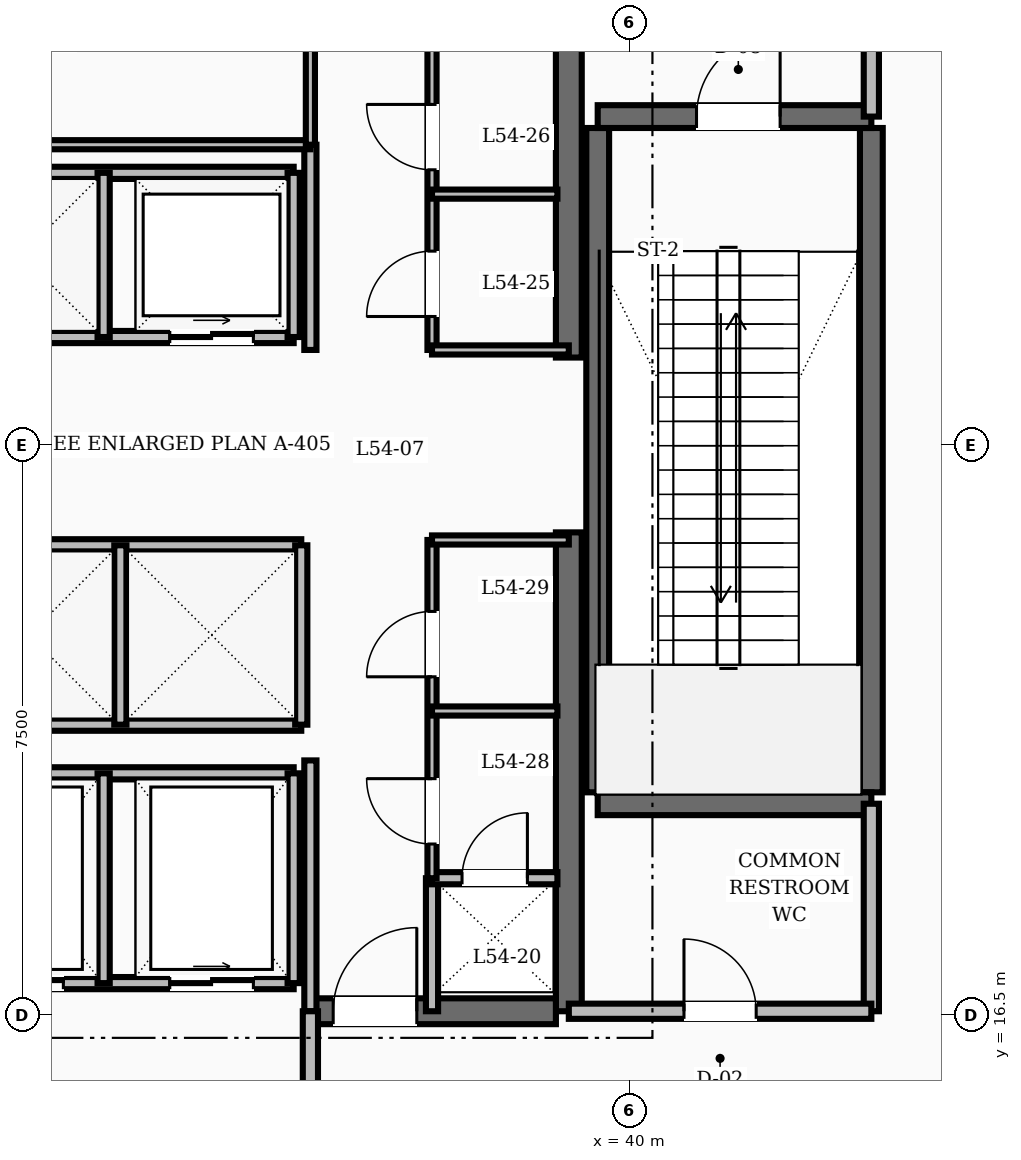
"""IFC4 building model, lengths in metres.
Left out: names, types, materials, properties, quantities, classifications, styles, units other than length and angle.
Written with IfcOpenShell. Run it as: python <this file> out.ifc"""

import sys

from ifc_helpers import new_model, si_unit, direction, frame, frame_2d, origin, place, context, subcontext, project, spatial, rectangle, extrude, element, fill, save


model = new_model("IFC4")
c1 = context("Model", 3, precision=1e-05, world=origin(), true_north=direction((0.0, 1.0)))
c2 = subcontext(c1, "Body", "Model", "MODEL_VIEW")
j1 = project(units=[si_unit("LENGTHUNIT", "METRE"), si_unit("PLANEANGLEUNIT", "RADIAN")], contexts=[c1])
p1 = place(None, origin())
s1 = spatial("IfcSite", under=j1, at=p1, CompositionType="ELEMENT")
p2 = place(p1, origin())
s2 = spatial("IfcBuilding", under=s1, at=p2, CompositionType="ELEMENT")
p3 = place(p2, frame((0.0, 0.0, 208.4)))
s3 = spatial("IfcBuildingStorey", under=s2, at=p3, CompositionType="ELEMENT", Elevation=208.4)
for number, where, z_axis, x_axis in (
    (1, (39.2, 16.55, 0.0), (0.0, 0.0, 1.0), (0.0, 1.0, 0.0)),
    (2, (39.2, 25.15, 0.0), (0.0, 0.0, 1.0), (0.0, 1.0, 0.0)),
):
    element("IfcWall", number, at=place(p3, frame(where, z_axis=z_axis, x_axis=x_axis)), inside=s3, PredefinedType="SHEAR", context=c2, shape_type="SweptSolid", body=[
        extrude(rectangle(XDim=6.3, YDim=0.34, at=frame_2d((3.15, 0.0))), origin(), (0.0, 0.0, 1.0), 6.4),
    ])
p4 = place(p3, frame((35.8, 16.55, 0.0), z_axis=(0.0, 0.0, 1.0), x_axis=(1.0, 0.0, 0.0)))
e3 = element("IfcWall", 3, at=p4, inside=s3, PredefinedType="SHEAR", context=c2, shape_type="SweptSolid", body=[
    extrude(rectangle(XDim=3.23, YDim=0.34, at=frame_2d((1.615, 0.0))), origin(), (0.0, 0.0, 1.0), 6.4),
])
p5 = place(p4, frame((0.3, 0.0, 0.0)))
e4 = element("IfcOpeningElement", 4, at=p5, cuts=e3, PredefinedType="OPENING", context=c2, shape_type="SweptSolid", body=[
    extrude(rectangle(XDim=1.1, YDim=2.1, at=frame_2d((0.55, 1.05))), frame((0.0, 0.18, 0.0), z_axis=(0.0, -1.0, 0.0), x_axis=(1.0, 0.0, 0.0)), (0.0, 0.0, 1.0), 0.36),
])
for number, where, z_axis, x_axis in (
    (5, (43.18, 19.43, 0.0), (0.0, 0.0, 1.0), (0.0, 1.0, 0.0)),
    (6, (39.58, 19.43, 0.0), (0.0, 0.0, 1.0), (0.0, 1.0, 0.0)),
):
    element("IfcWall", number, at=place(p3, frame(where, z_axis=z_axis, x_axis=x_axis)), inside=s3, PredefinedType="SHEAR", context=c2, shape_type="SweptSolid", body=[
        extrude(rectangle(XDim=8.74, YDim=0.3, at=frame_2d((4.37, 0.0))), origin(), (0.0, 0.0, 1.0), 6.4),
    ])
p6 = place(p3, frame((39.58, 19.28, 0.0), z_axis=(0.0, 0.0, 1.0), x_axis=(1.0, 0.0, 0.0)))
e7 = element("IfcWall", 7, at=p6, inside=s3, PredefinedType="SHEAR", context=c2, shape_type="SweptSolid", body=[
    extrude(rectangle(XDim=3.6, YDim=0.3, at=frame_2d((1.8, 0.0))), origin(), (0.0, 0.0, 1.0), 6.4),
])
p7 = place(p3, frame((39.58, 28.32, 0.0), z_axis=(0.0, 0.0, 1.0), x_axis=(1.0, 0.0, 0.0)))
e8 = element("IfcWall", 8, at=p7, inside=s3, PredefinedType="SHEAR", context=c2, shape_type="SweptSolid", body=[
    extrude(rectangle(XDim=3.6, YDim=0.3, at=frame_2d((1.8, 0.0))), origin(), (0.0, 0.0, 1.0), 6.4),
])
p8 = place(p7, frame((1.3, 0.0, 0.0)))
e9 = element("IfcOpeningElement", 9, at=p8, cuts=e8, PredefinedType="OPENING", context=c2, shape_type="SweptSolid", body=[
    extrude(rectangle(XDim=1.1, YDim=2.1, at=frame_2d((0.55, 1.05))), frame((0.0, 0.16, 0.0), z_axis=(0.0, -1.0, 0.0), x_axis=(1.0, 0.0, 0.0)), (0.0, 0.0, 1.0), 0.32),
])
p9 = place(p3, frame((43.18, 28.32, 0.0), z_axis=(0.0, 0.0, 1.0), x_axis=(0.0, 1.0, 0.0)))
e10 = element("IfcWall", 10, at=p9, inside=s3, PredefinedType="SOLIDWALL", context=c2, shape_type="SweptSolid", body=[
    extrude(rectangle(XDim=3.13, YDim=0.2, at=frame_2d((1.565, 0.0))), origin(), (0.0, 0.0, 1.0), 5.13),
])
p10 = place(p9, frame((1.015, 0.0, 0.0)))
e11 = element("IfcOpeningElement", 11, at=p10, cuts=e10, PredefinedType="OPENING", context=c2, shape_type="SweptSolid", body=[
    extrude(rectangle(XDim=1.1, YDim=2.1, at=frame_2d((0.55, 1.05))), frame((0.0, 0.11, 0.0), z_axis=(0.0, -1.0, 0.0), x_axis=(1.0, 0.0, 0.0)), (0.0, 0.0, 1.0), 0.22),
])
p11 = place(p3, frame((43.18, 16.55, 0.0), z_axis=(0.0, 0.0, 1.0), x_axis=(0.0, 1.0, 0.0)))
e12 = element("IfcWall", 12, at=p11, inside=s3, PredefinedType="SOLIDWALL", context=c2, shape_type="SweptSolid", body=[
    extrude(rectangle(XDim=2.73, YDim=0.2, at=frame_2d((1.365, 0.0))), origin(), (0.0, 0.0, 1.0), 5.13),
])
p12 = place(p3, frame((39.2, 16.55, 0.0), z_axis=(0.0, 0.0, 1.0), x_axis=(1.0, 0.0, 0.0)))
e13 = element("IfcWall", 13, at=p12, inside=s3, PredefinedType="SOLIDWALL", context=c2, shape_type="SweptSolid", body=[
    extrude(rectangle(XDim=3.98, YDim=0.2, at=frame_2d((1.99, 0.0))), origin(), (0.0, 0.0, 1.0), 5.13),
])
p13 = place(p12, frame((1.515, 0.0, 0.0)))
e14 = element("IfcOpeningElement", 14, at=p13, cuts=e13, PredefinedType="OPENING", context=c2, shape_type="SweptSolid", body=[
    extrude(rectangle(XDim=0.95, YDim=2.1, at=frame_2d((0.475, 1.05))), frame((0.0, 0.11, 0.0), z_axis=(0.0, -1.0, 0.0), x_axis=(1.0, 0.0, 0.0)), (0.0, 0.0, 1.0), 0.22),
])
p14 = place(p3, frame((35.8, 16.55, 0.0), z_axis=(0.0, 0.0, 1.0), x_axis=(0.0, 1.0, 0.0)))
e15 = element("IfcWall", 15, at=p14, inside=s3, PredefinedType="SOLIDWALL", context=c2, shape_type="SweptSolid", body=[
    extrude(rectangle(XDim=3.3, YDim=0.16, at=frame_2d((1.65, 0.0))), origin(), (0.0, 0.0, 1.0), 5.13),
])
p15 = place(p3, frame((37.4, 16.55, 0.0), z_axis=(0.0, 0.0, 1.0), x_axis=(0.0, 1.0, 0.0)))
e16 = element("IfcWall", 16, at=p15, inside=s3, PredefinedType="SOLIDWALL", context=c2, shape_type="SweptSolid", body=[
    extrude(rectangle(XDim=1.75, YDim=0.16, at=frame_2d((0.875, 0.0))), origin(), (0.0, 0.0, 1.0), 5.13),
])
p16 = place(p3, frame((35.8, 25.25, 0.0), z_axis=(0.0, 0.0, 1.0), x_axis=(0.0, 1.0, 0.0)))
e17 = element("IfcWall", 17, at=p16, inside=s3, PredefinedType="SOLIDWALL", context=c2, shape_type="SweptSolid", body=[
    extrude(rectangle(XDim=2.7, YDim=0.16, at=frame_2d((1.35, 0.0))), origin(), (0.0, 0.0, 1.0), 5.13),
])
p17 = place(p3, frame((35.8, 14.35, 0.0), z_axis=(0.0, 0.0, 1.0), x_axis=(0.0, 1.0, 0.0)))
e18 = element("IfcWall", 18, at=p17, inside=s3, PredefinedType="SOLIDWALL", context=c2, shape_type="SweptSolid", body=[
    extrude(rectangle(XDim=2.2, YDim=0.2, at=frame_2d((1.1, 0.0))), origin(), (0.0, 0.0, 1.0), 5.13),
])
p18 = place(p3, frame((28.42, 25.42, 0.0), z_axis=(0.0, 0.0, 1.0), x_axis=(1.0, 0.0, 0.0)))
e19 = element("IfcWall", 19, at=p18, inside=s3, PredefinedType="SOLIDWALL", context=c2, shape_type="SweptSolid", body=[
    extrude(rectangle(XDim=7.16, YDim=0.16, at=frame_2d((3.58, 0.0))), origin(), (0.0, 0.0, 1.0), 5.13),
])
p19 = place(p18, frame((5.53, 0.0, 0.0)))
e20 = element("IfcOpeningElement", 20, at=p19, cuts=e19, PredefinedType="OPENING", context=c2, shape_type="SweptSolid", body=[
    extrude(rectangle(XDim=1.1, YDim=2.15, at=frame_2d((0.55, 1.075))), frame((0.0, 0.09, 0.0), z_axis=(0.0, -1.0, 0.0), x_axis=(1.0, 0.0, 0.0)), (0.0, 0.0, 1.0), 0.18),
])
p20 = place(p3, frame((28.42, 27.58, 0.0), z_axis=(0.0, 0.0, 1.0), x_axis=(1.0, 0.0, 0.0)))
e21 = element("IfcWall", 21, at=p20, inside=s3, PredefinedType="SOLIDWALL", context=c2, shape_type="SweptSolid", body=[
    extrude(rectangle(XDim=7.16, YDim=0.16, at=frame_2d((3.58, 0.0))), origin(), (0.0, 0.0, 1.0), 5.13),
])
for number, where, z_axis, x_axis in (
    (22, (33.08, 25.42, 0.0), (0.0, 0.0, 1.0), (0.0, 1.0, 0.0)),
    (23, (35.58, 25.42, 0.0), (0.0, 0.0, 1.0), (0.0, 1.0, 0.0)),
):
    element("IfcWall", number, at=place(p3, frame(where, z_axis=z_axis, x_axis=x_axis)), inside=s3, PredefinedType="SOLIDWALL", context=c2, shape_type="SweptSolid", body=[
        extrude(rectangle(XDim=2.16, YDim=0.16, at=frame_2d((1.08, 0.0))), origin(), (0.0, 0.0, 1.0), 5.13),
    ])
p21 = place(p3, frame((28.42, 22.68, 0.0), z_axis=(0.0, 0.0, 1.0), x_axis=(1.0, 0.0, 0.0)))
e24 = element("IfcWall", 24, at=p21, inside=s3, PredefinedType="SOLIDWALL", context=c2, shape_type="SweptSolid", body=[
    extrude(rectangle(XDim=7.26, YDim=0.16, at=frame_2d((3.63, 0.0))), origin(), (0.0, 0.0, 1.0), 5.13),
])
p22 = place(p21, frame((0.53, 0.0, 0.0)))
e25 = element("IfcOpeningElement", 25, at=p22, cuts=e24, PredefinedType="OPENING", context=c2, shape_type="SweptSolid", body=[
    extrude(rectangle(XDim=1.1, YDim=2.15, at=frame_2d((0.55, 1.075))), frame((0.0, 0.09, 0.0), z_axis=(0.0, -1.0, 0.0), x_axis=(1.0, 0.0, 0.0)), (0.0, 0.0, 1.0), 0.18),
])
p23 = place(p3, frame((28.42, 20.32, 0.0), z_axis=(0.0, 0.0, 1.0), x_axis=(1.0, 0.0, 0.0)))
e26 = element("IfcWall", 26, at=p23, inside=s3, PredefinedType="SOLIDWALL", context=c2, shape_type="SweptSolid", body=[
    extrude(rectangle(XDim=7.26, YDim=0.16, at=frame_2d((3.63, 0.0))), origin(), (0.0, 0.0, 1.0), 5.13),
])
for number, where, z_axis, x_axis in (
    (27, (33.3, 20.32, 0.0), (0.0, 0.0, 1.0), (0.0, 1.0, 0.0)),
    (28, (35.68, 20.32, 0.0), (0.0, 0.0, 1.0), (0.0, 1.0, 0.0)),
):
    element("IfcWall", number, at=place(p3, frame(where, z_axis=z_axis, x_axis=x_axis)), inside=s3, PredefinedType="SOLIDWALL", context=c2, shape_type="SweptSolid", body=[
        extrude(rectangle(XDim=2.36, YDim=0.16, at=frame_2d((1.18, 0.0))), origin(), (0.0, 0.0, 1.0), 5.13),
    ])
p24 = place(p3, frame((28.42, 16.92, 0.0), z_axis=(0.0, 0.0, 1.0), x_axis=(1.0, 0.0, 0.0)))
e29 = element("IfcWall", 29, at=p24, inside=s3, PredefinedType="SOLIDWALL", context=c2, shape_type="SweptSolid", body=[
    extrude(rectangle(XDim=7.16, YDim=0.16, at=frame_2d((3.58, 0.0))), origin(), (0.0, 0.0, 1.0), 5.13),
])
p25 = place(p24, frame((0.53, 0.0, 0.0)))
e30 = element("IfcOpeningElement", 30, at=p25, cuts=e29, PredefinedType="OPENING", context=c2, shape_type="SweptSolid", body=[
    extrude(rectangle(XDim=1.1, YDim=2.15, at=frame_2d((0.55, 1.075))), frame((0.0, 0.09, 0.0), z_axis=(0.0, -1.0, 0.0), x_axis=(1.0, 0.0, 0.0)), (0.0, 0.0, 1.0), 0.18),
])
p26 = place(p24, frame((3.03, 0.0, 0.0)))
e31 = element("IfcOpeningElement", 31, at=p26, cuts=e29, PredefinedType="OPENING", context=c2, shape_type="SweptSolid", body=[
    extrude(rectangle(XDim=1.1, YDim=2.15, at=frame_2d((0.55, 1.075))), frame((0.0, 0.09, 0.0), z_axis=(0.0, -1.0, 0.0), x_axis=(1.0, 0.0, 0.0)), (0.0, 0.0, 1.0), 0.18),
])
p27 = place(p24, frame((5.53, 0.0, 0.0)))
e32 = element("IfcOpeningElement", 32, at=p27, cuts=e29, PredefinedType="OPENING", context=c2, shape_type="SweptSolid", body=[
    extrude(rectangle(XDim=1.1, YDim=2.15, at=frame_2d((0.55, 1.075))), frame((0.0, 0.09, 0.0), z_axis=(0.0, -1.0, 0.0), x_axis=(1.0, 0.0, 0.0)), (0.0, 0.0, 1.0), 0.18),
])
p28 = place(p3, frame((28.42, 19.68, 0.0), z_axis=(0.0, 0.0, 1.0), x_axis=(1.0, 0.0, 0.0)))
e33 = element("IfcWall", 33, at=p28, inside=s3, PredefinedType="SOLIDWALL", context=c2, shape_type="SweptSolid", body=[
    extrude(rectangle(XDim=7.16, YDim=0.16, at=frame_2d((3.58, 0.0))), origin(), (0.0, 0.0, 1.0), 5.13),
])
for number, where, z_axis, x_axis in (
    (34, (33.08, 16.92, 0.0), (0.0, 0.0, 1.0), (0.0, 1.0, 0.0)),
    (35, (35.58, 16.92, 0.0), (0.0, 0.0, 1.0), (0.0, 1.0, 0.0)),
):
    element("IfcWall", number, at=place(p3, frame(where, z_axis=z_axis, x_axis=x_axis)), inside=s3, PredefinedType="SOLIDWALL", context=c2, shape_type="SweptSolid", body=[
        extrude(rectangle(XDim=2.76, YDim=0.16, at=frame_2d((1.38, 0.0))), origin(), (0.0, 0.0, 1.0), 5.13),
    ])
p29 = place(p3, frame((28.2, 27.95, 0.0), z_axis=(0.0, 0.0, 1.0), x_axis=(1.0, 0.0, 0.0)))
e36 = element("IfcWall", 36, at=p29, inside=s3, PredefinedType="PARTITIONING", context=c2, shape_type="SweptSolid", body=[
    extrude(rectangle(XDim=7.6, YDim=0.12, at=frame_2d((3.8, 0.0))), origin(), (0.0, 0.0, 1.0), 5.13),
])
p30 = place(p3, frame((35.8, 27.95, 0.0), z_axis=(0.0, 0.0, 1.0), x_axis=(0.0, 1.0, 0.0)))
e37 = element("IfcWall", 37, at=p30, inside=s3, PredefinedType="PARTITIONING", context=c2, shape_type="SweptSolid", body=[
    extrude(rectangle(XDim=3.5, YDim=0.12, at=frame_2d((1.75, 0.0))), origin(), (0.0, 0.0, 1.0), 5.13),
])
p31 = place(p30, frame((1.275, 0.0, 0.0)))
e38 = element("IfcOpeningElement", 38, at=p31, cuts=e37, PredefinedType="OPENING", context=c2, shape_type="SweptSolid", body=[
    extrude(rectangle(XDim=0.95, YDim=2.1, at=frame_2d((0.475, 1.05))), frame((0.0, 0.07, 0.0), z_axis=(0.0, -1.0, 0.0), x_axis=(1.0, 0.0, 0.0)), (0.0, 0.0, 1.0), 0.14),
])
p32 = place(p3, frame((37.4, 18.3, 0.0), z_axis=(0.0, 0.0, 1.0), x_axis=(1.0, 0.0, 0.0)))
e39 = element("IfcWall", 39, at=p32, inside=s3, PredefinedType="SOLIDWALL", context=c2, shape_type="SweptSolid", body=[
    extrude(rectangle(XDim=1.65, YDim=0.16, at=frame_2d((0.825, 0.0))), origin(), (0.0, 0.0, 1.0), 5.13),
])
p33 = place(p32, frame((0.395, 0.0, 0.0)))
e40 = element("IfcOpeningElement", 40, at=p33, cuts=e39, PredefinedType="OPENING", context=c2, shape_type="SweptSolid", body=[
    extrude(rectangle(XDim=0.86, YDim=2.1, at=frame_2d((0.43, 1.05))), frame((0.0, 0.09, 0.0), z_axis=(0.0, -1.0, 0.0), x_axis=(1.0, 0.0, 0.0)), (0.0, 0.0, 1.0), 0.18),
])
p34 = place(p3, frame((37.4, 25.25, 0.0), z_axis=(0.0, 0.0, 1.0), x_axis=(0.0, 1.0, 0.0)))
e41 = element("IfcWall", 41, at=p34, inside=s3, PredefinedType="PARTITIONING", context=c2, shape_type="SweptSolid", body=[
    extrude(rectangle(XDim=6.2, YDim=0.12, at=frame_2d((3.1, 0.0))), origin(), (0.0, 0.0, 1.0), 5.13),
])
p35 = place(p34, frame((0.44, 0.0, 0.0)))
e42 = element("IfcOpeningElement", 42, at=p35, cuts=e41, PredefinedType="OPENING", context=c2, shape_type="SweptSolid", body=[
    extrude(rectangle(XDim=0.86, YDim=2.1, at=frame_2d((0.43, 1.05))), frame((0.0, 0.07, 0.0), z_axis=(0.0, -1.0, 0.0), x_axis=(1.0, 0.0, 0.0)), (0.0, 0.0, 1.0), 0.14),
])
p36 = place(p34, frame((2.37, 0.0, 0.0)))
e43 = element("IfcOpeningElement", 43, at=p36, cuts=e41, PredefinedType="OPENING", context=c2, shape_type="SweptSolid", body=[
    extrude(rectangle(XDim=0.86, YDim=2.1, at=frame_2d((0.43, 1.05))), frame((0.0, 0.07, 0.0), z_axis=(0.0, -1.0, 0.0), x_axis=(1.0, 0.0, 0.0)), (0.0, 0.0, 1.0), 0.14),
])
p37 = place(p34, frame((4.39, 0.0, 0.0)))
e44 = element("IfcOpeningElement", 44, at=p37, cuts=e41, PredefinedType="OPENING", context=c2, shape_type="SweptSolid", body=[
    extrude(rectangle(XDim=0.86, YDim=2.1, at=frame_2d((0.43, 1.05))), frame((0.0, 0.07, 0.0), z_axis=(0.0, -1.0, 0.0), x_axis=(1.0, 0.0, 0.0)), (0.0, 0.0, 1.0), 0.14),
])
p38 = place(p3, frame((37.4, 25.25, 0.0), z_axis=(0.0, 0.0, 1.0), x_axis=(1.0, 0.0, 0.0)))
e45 = element("IfcWall", 45, at=p38, inside=s3, PredefinedType="PARTITIONING", context=c2, shape_type="SweptSolid", body=[
    extrude(rectangle(XDim=1.8, YDim=0.12, at=frame_2d((0.9, 0.0))), origin(), (0.0, 0.0, 1.0), 5.13),
])
p39 = place(p3, frame((37.4, 18.3, 0.0), z_axis=(0.0, 0.0, 1.0), x_axis=(0.0, 1.0, 0.0)))
e46 = element("IfcWall", 46, at=p39, inside=s3, PredefinedType="PARTITIONING", context=c2, shape_type="SweptSolid", body=[
    extrude(rectangle(XDim=4.45, YDim=0.12, at=frame_2d((2.225, 0.0))), origin(), (0.0, 0.0, 1.0), 5.13),
])
p40 = place(p39, frame((0.45, 0.0, 0.0)))
e47 = element("IfcOpeningElement", 47, at=p40, cuts=e46, PredefinedType="OPENING", context=c2, shape_type="SweptSolid", body=[
    extrude(rectangle(XDim=0.86, YDim=2.1, at=frame_2d((0.43, 1.05))), frame((0.0, 0.07, 0.0), z_axis=(0.0, -1.0, 0.0), x_axis=(1.0, 0.0, 0.0)), (0.0, 0.0, 1.0), 0.14),
])
p41 = place(p39, frame((2.65, 0.0, 0.0)))
e48 = element("IfcOpeningElement", 48, at=p41, cuts=e46, PredefinedType="OPENING", context=c2, shape_type="SweptSolid", body=[
    extrude(rectangle(XDim=0.86, YDim=2.1, at=frame_2d((0.43, 1.05))), frame((0.0, 0.07, 0.0), z_axis=(0.0, -1.0, 0.0), x_axis=(1.0, 0.0, 0.0)), (0.0, 0.0, 1.0), 0.14),
])
p42 = place(p3, frame((37.4, 22.75, 0.0), z_axis=(0.0, 0.0, 1.0), x_axis=(1.0, 0.0, 0.0)))
e49 = element("IfcWall", 49, at=p42, inside=s3, PredefinedType="PARTITIONING", context=c2, shape_type="SweptSolid", body=[
    extrude(rectangle(XDim=1.8, YDim=0.12, at=frame_2d((0.9, 0.0))), origin(), (0.0, 0.0, 1.0), 5.13),
])
for number, where, z_axis, x_axis in (
    (50, (37.4, 27.3, 0.0), (0.0, 0.0, 1.0), (1.0, 0.0, 0.0)),
    (51, (37.4, 20.5, 0.0), (0.0, 0.0, 1.0), (1.0, 0.0, 0.0)),
):
    element("IfcWall", number, at=place(p3, frame(where, z_axis=z_axis, x_axis=x_axis)), inside=s3, PredefinedType="PARTITIONING", context=c2, shape_type="SweptSolid", body=[
        extrude(rectangle(XDim=1.65, YDim=0.12, at=frame_2d((0.825, 0.0))), origin(), (0.0, 0.0, 1.0), 5.13),
    ])
p43 = place(p8, origin())
e52 = element("IfcDoor", 52, at=p43, inside=s3, OperationType="SINGLE_SWING_RIGHT", PredefinedType="DOOR", context=c2, shape_type="SweptSolid", body=[
    extrude(rectangle(XDim=1.1, YDim=2.1, at=frame_2d((0.55, 1.05))), frame((0.0, 0.025, 0.0), z_axis=(0.0, -1.0, 0.0), x_axis=(1.0, 0.0, 0.0)), (0.0, 0.0, 1.0), 0.05),
])
fill(e9, e52)
p44 = place(p13, origin())
e53 = element("IfcDoor", 53, at=p44, inside=s3, OperationType="SINGLE_SWING_LEFT", PredefinedType="DOOR", context=c2, shape_type="SweptSolid", body=[
    extrude(rectangle(XDim=0.95, YDim=2.1, at=frame_2d((0.475, 1.05))), frame((0.0, 0.025, 0.0), z_axis=(0.0, -1.0, 0.0), x_axis=(1.0, 0.0, 0.0)), (0.0, 0.0, 1.0), 0.05),
])
fill(e14, e53)
p45 = place(p5, origin())
e54 = element("IfcDoor", 54, at=p45, inside=s3, OperationType="SINGLE_SWING_RIGHT", PredefinedType="DOOR", context=c2, shape_type="SweptSolid", body=[
    extrude(rectangle(XDim=1.1, YDim=2.1, at=frame_2d((0.55, 1.05))), frame((0.0, 0.025, 0.0), z_axis=(0.0, -1.0, 0.0), x_axis=(1.0, 0.0, 0.0)), (0.0, 0.0, 1.0), 0.05),
])
fill(e4, e54)
p46 = place(p19, origin())
e55 = element("IfcDoor", 55, at=p46, inside=s3, OperationType="SLIDING_TO_RIGHT", PredefinedType="DOOR", context=c2, shape_type="SweptSolid", body=[
    extrude(rectangle(XDim=1.1, YDim=2.15, at=frame_2d((0.55, 1.075))), frame((0.0, 0.025, 0.0), z_axis=(0.0, -1.0, 0.0), x_axis=(1.0, 0.0, 0.0)), (0.0, 0.0, 1.0), 0.05),
])
fill(e20, e55)
p47 = place(p26, origin())
e56 = element("IfcDoor", 56, at=p47, inside=s3, OperationType="SLIDING_TO_RIGHT", PredefinedType="DOOR", context=c2, shape_type="SweptSolid", body=[
    extrude(rectangle(XDim=1.1, YDim=2.15, at=frame_2d((0.55, 1.075))), frame((0.0, 0.025, 0.0), z_axis=(0.0, -1.0, 0.0), x_axis=(1.0, 0.0, 0.0)), (0.0, 0.0, 1.0), 0.05),
])
fill(e31, e56)
p48 = place(p27, origin())
e57 = element("IfcDoor", 57, at=p48, inside=s3, OperationType="SLIDING_TO_RIGHT", PredefinedType="DOOR", context=c2, shape_type="SweptSolid", body=[
    extrude(rectangle(XDim=1.1, YDim=2.15, at=frame_2d((0.55, 1.075))), frame((0.0, 0.025, 0.0), z_axis=(0.0, -1.0, 0.0), x_axis=(1.0, 0.0, 0.0)), (0.0, 0.0, 1.0), 0.05),
])
fill(e32, e57)
p49 = place(p33, origin())
e58 = element("IfcDoor", 58, at=p49, inside=s3, OperationType="SINGLE_SWING_RIGHT", PredefinedType="TRAPDOOR", context=c2, shape_type="SweptSolid", body=[
    extrude(rectangle(XDim=0.86, YDim=2.1, at=frame_2d((0.43, 1.05))), frame((0.0, 0.025, 0.0), z_axis=(0.0, -1.0, 0.0), x_axis=(1.0, 0.0, 0.0)), (0.0, 0.0, 1.0), 0.05),
])
fill(e40, e58)
p50 = place(p35, origin())
e59 = element("IfcDoor", 59, at=p50, inside=s3, OperationType="SINGLE_SWING_LEFT", PredefinedType="DOOR", context=c2, shape_type="SweptSolid", body=[
    extrude(rectangle(XDim=0.86, YDim=2.1, at=frame_2d((0.43, 1.05))), frame((0.0, 0.025, 0.0), z_axis=(0.0, -1.0, 0.0), x_axis=(1.0, 0.0, 0.0)), (0.0, 0.0, 1.0), 0.05),
])
fill(e42, e59)
p51 = place(p36, origin())
e60 = element("IfcDoor", 60, at=p51, inside=s3, OperationType="SINGLE_SWING_RIGHT", PredefinedType="DOOR", context=c2, shape_type="SweptSolid", body=[
    extrude(rectangle(XDim=0.86, YDim=2.1, at=frame_2d((0.43, 1.05))), frame((0.0, 0.025, 0.0), z_axis=(0.0, -1.0, 0.0), x_axis=(1.0, 0.0, 0.0)), (0.0, 0.0, 1.0), 0.05),
])
fill(e43, e60)
p52 = place(p40, origin())
e61 = element("IfcDoor", 61, at=p52, inside=s3, OperationType="SINGLE_SWING_RIGHT", PredefinedType="DOOR", context=c2, shape_type="SweptSolid", body=[
    extrude(rectangle(XDim=0.86, YDim=2.1, at=frame_2d((0.43, 1.05))), frame((0.0, 0.025, 0.0), z_axis=(0.0, -1.0, 0.0), x_axis=(1.0, 0.0, 0.0)), (0.0, 0.0, 1.0), 0.05),
])
fill(e47, e61)
p53 = place(p41, origin())
e62 = element("IfcDoor", 62, at=p53, inside=s3, OperationType="SINGLE_SWING_LEFT", PredefinedType="DOOR", context=c2, shape_type="SweptSolid", body=[
    extrude(rectangle(XDim=0.86, YDim=2.1, at=frame_2d((0.43, 1.05))), frame((0.0, 0.025, 0.0), z_axis=(0.0, -1.0, 0.0), x_axis=(1.0, 0.0, 0.0)), (0.0, 0.0, 1.0), 0.05),
])
fill(e48, e62)
save(model, sys.argv[1])
